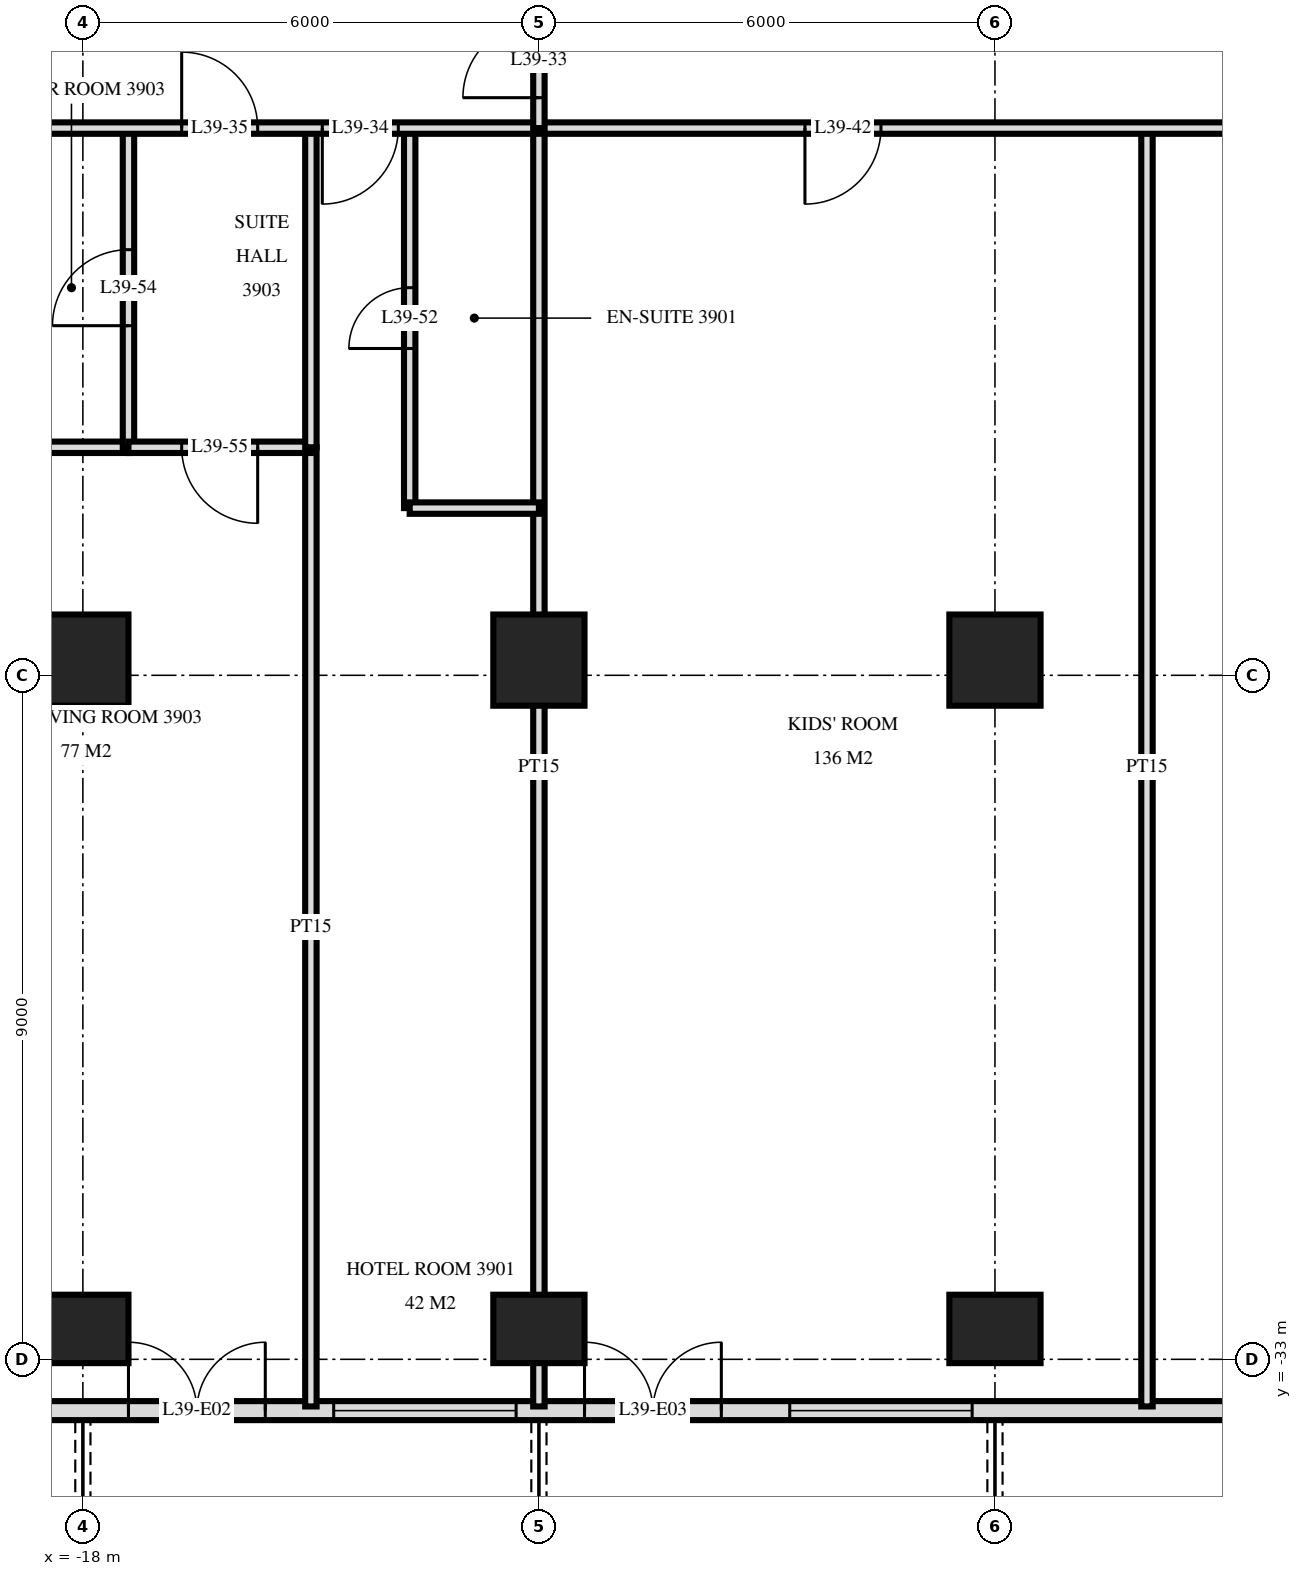
"""IFC4 building model, lengths in metres.
Left out: names, types, materials, properties, quantities, classifications, styles, units other than length and angle.
Written with IfcOpenShell. Run it as: python <this file> out.ifc"""

import sys

from ifc_helpers import new_model, si_unit, direction, frame, frame_2d, origin, origin_2d, place, context, subcontext, project, spatial, rectangle, extrude, element, fill, save


model = new_model("IFC4")
c1 = context("Model", 3, precision=1e-05, world=origin(), true_north=direction((0.0, 1.0)))
c2 = subcontext(c1, "Body", "Model", "MODEL_VIEW")
j1 = project(units=[si_unit("LENGTHUNIT", "METRE"), si_unit("PLANEANGLEUNIT", "RADIAN")], contexts=[c1])
p1 = place(None, origin())
s1 = spatial("IfcSite", under=j1, at=p1, CompositionType="ELEMENT")
p2 = place(p1, origin())
s2 = spatial("IfcBuilding", under=s1, at=p2, CompositionType="ELEMENT")
p3 = place(p2, frame((0.0, 0.0, 152.4)))
s3 = spatial("IfcBuildingStorey", under=s2, at=p3, CompositionType="ELEMENT", Elevation=152.4)
p4 = place(p3, frame((-18.0, -32.6, 0.0), z_axis=(0.0, 0.0, 1.0), x_axis=(1.0, 0.0, 0.0)))
e1 = element("IfcColumn", 1, at=p4, inside=s3, PredefinedType="COLUMN", context=c2, shape_type="SweptSolid", body=[
    extrude(rectangle(XDim=1.2, YDim=0.9, at=origin_2d()), origin(), (0.0, 0.0, 1.0), 3.6),
])
p5 = place(p3, frame((-18.0, -23.8, 0.0), z_axis=(0.0, 0.0, 1.0), x_axis=(1.0, 0.0, 0.0)))
e2 = element("IfcColumn", 2, at=p5, inside=s3, PredefinedType="COLUMN", context=c2, shape_type="SweptSolid", body=[
    extrude(rectangle(XDim=1.2, YDim=1.2, at=origin_2d()), origin(), (0.0, 0.0, 1.0), 3.6),
])
p6 = place(p3, frame((-12.0, -32.6, 0.0), z_axis=(0.0, 0.0, 1.0), x_axis=(1.0, 0.0, 0.0)))
e3 = element("IfcColumn", 3, at=p6, inside=s3, PredefinedType="COLUMN", context=c2, shape_type="SweptSolid", body=[
    extrude(rectangle(XDim=1.2, YDim=0.9, at=origin_2d()), origin(), (0.0, 0.0, 1.0), 3.6),
])
p7 = place(p3, frame((-12.0, -23.8, 0.0), z_axis=(0.0, 0.0, 1.0), x_axis=(1.0, 0.0, 0.0)))
e4 = element("IfcColumn", 4, at=p7, inside=s3, PredefinedType="COLUMN", context=c2, shape_type="SweptSolid", body=[
    extrude(rectangle(XDim=1.2, YDim=1.2, at=origin_2d()), origin(), (0.0, 0.0, 1.0), 3.6),
])
p8 = place(p3, frame((-6.0, -32.6, 0.0), z_axis=(0.0, 0.0, 1.0), x_axis=(1.0, 0.0, 0.0)))
e5 = element("IfcColumn", 5, at=p8, inside=s3, PredefinedType="COLUMN", context=c2, shape_type="SweptSolid", body=[
    extrude(rectangle(XDim=1.2, YDim=0.9, at=origin_2d()), origin(), (0.0, 0.0, 1.0), 3.6),
])
p9 = place(p3, frame((-6.0, -23.8, 0.0), z_axis=(0.0, 0.0, 1.0), x_axis=(1.0, 0.0, 0.0)))
e6 = element("IfcColumn", 6, at=p9, inside=s3, PredefinedType="COLUMN", context=c2, shape_type="SweptSolid", body=[
    extrude(rectangle(XDim=1.2, YDim=1.2, at=origin_2d()), origin(), (0.0, 0.0, 1.0), 3.6),
])
p10 = place(p3, frame((-23.675, -33.675, 0.0), z_axis=(0.0, 0.0, 1.0), x_axis=(1.0, 0.0, 0.0)))
e7 = element("IfcWall", 7, at=p10, inside=s3, PredefinedType="SOLIDWALL", context=c2, shape_type="SweptSolid", body=[
    extrude(rectangle(XDim=47.351, YDim=0.25, at=frame_2d((23.675, 0.0))), origin(), (0.0, 0.0, 1.0), 3.32),
])
p11 = place(p10, frame((3.425, 0.0, 0.0)))
e8 = element("IfcOpeningElement", 8, at=p11, cuts=e7, PredefinedType="OPENING", context=c2, shape_type="SweptSolid", body=[
    extrude(rectangle(XDim=1.8, YDim=2.4, at=frame_2d((0.9, 1.2))), frame((0.0, 0.135, 0.0), z_axis=(0.0, -1.0, 0.0), x_axis=(1.0, 0.0, 0.0)), (0.0, 0.0, 1.0), 0.27),
])
p12 = place(p10, frame((6.275, 0.0, 0.0)))
e9 = element("IfcOpeningElement", 9, at=p12, cuts=e7, PredefinedType="OPENING", context=c2, shape_type="SweptSolid", body=[
    extrude(rectangle(XDim=1.8, YDim=2.4, at=frame_2d((0.9, 1.2))), frame((0.0, 0.135, 0.0), z_axis=(0.0, -1.0, 0.0), x_axis=(1.0, 0.0, 0.0)), (0.0, 0.0, 1.0), 0.27),
])
p13 = place(p10, frame((8.975, 0.0, 0.3)))
e10 = element("IfcOpeningElement", 10, at=p13, cuts=e7, PredefinedType="OPENING", context=c2, shape_type="SweptSolid", body=[
    extrude(rectangle(XDim=2.4, YDim=2.1, at=frame_2d((1.2, 1.05))), frame((0.0, 0.135, 0.0), z_axis=(0.0, -1.0, 0.0), x_axis=(1.0, 0.0, 0.0)), (0.0, 0.0, 1.0), 0.27),
])
p14 = place(p10, frame((12.275, 0.0, 0.0)))
e11 = element("IfcOpeningElement", 11, at=p14, cuts=e7, PredefinedType="OPENING", context=c2, shape_type="SweptSolid", body=[
    extrude(rectangle(XDim=1.8, YDim=2.4, at=frame_2d((0.9, 1.2))), frame((0.0, 0.135, 0.0), z_axis=(0.0, -1.0, 0.0), x_axis=(1.0, 0.0, 0.0)), (0.0, 0.0, 1.0), 0.27),
])
p15 = place(p10, frame((14.975, 0.0, 0.3)))
e12 = element("IfcOpeningElement", 12, at=p15, cuts=e7, PredefinedType="OPENING", context=c2, shape_type="SweptSolid", body=[
    extrude(rectangle(XDim=2.4, YDim=2.1, at=frame_2d((1.2, 1.05))), frame((0.0, 0.135, 0.0), z_axis=(0.0, -1.0, 0.0), x_axis=(1.0, 0.0, 0.0)), (0.0, 0.0, 1.0), 0.27),
])
p16 = place(p10, frame((21.275, 0.0, 0.0)))
e13 = element("IfcOpeningElement", 13, at=p16, cuts=e7, PredefinedType="OPENING", context=c2, shape_type="SweptSolid", body=[
    extrude(rectangle(XDim=1.8, YDim=2.4, at=frame_2d((0.9, 1.2))), frame((0.0, 0.135, 0.0), z_axis=(0.0, -1.0, 0.0), x_axis=(1.0, 0.0, 0.0)), (0.0, 0.0, 1.0), 0.27),
])
p17 = place(p10, frame((24.275, 0.0, 0.0)))
e14 = element("IfcOpeningElement", 14, at=p17, cuts=e7, PredefinedType="OPENING", context=c2, shape_type="SweptSolid", body=[
    extrude(rectangle(XDim=1.8, YDim=2.4, at=frame_2d((0.9, 1.2))), frame((0.0, 0.135, 0.0), z_axis=(0.0, -1.0, 0.0), x_axis=(1.0, 0.0, 0.0)), (0.0, 0.0, 1.0), 0.27),
])
p18 = place(p10, frame((30.275, 0.0, 0.0)))
e15 = element("IfcOpeningElement", 15, at=p18, cuts=e7, PredefinedType="OPENING", context=c2, shape_type="SweptSolid", body=[
    extrude(rectangle(XDim=1.8, YDim=2.4, at=frame_2d((0.9, 1.2))), frame((0.0, 0.135, 0.0), z_axis=(0.0, -1.0, 0.0), x_axis=(1.0, 0.0, 0.0)), (0.0, 0.0, 1.0), 0.27),
])
p19 = place(p10, frame((32.975, 0.0, 0.3)))
e16 = element("IfcOpeningElement", 16, at=p19, cuts=e7, PredefinedType="OPENING", context=c2, shape_type="SweptSolid", body=[
    extrude(rectangle(XDim=2.4, YDim=2.1, at=frame_2d((1.2, 1.05))), frame((0.0, 0.135, 0.0), z_axis=(0.0, -1.0, 0.0), x_axis=(1.0, 0.0, 0.0)), (0.0, 0.0, 1.0), 0.27),
])
p20 = place(p10, frame((36.275, 0.0, 0.0)))
e17 = element("IfcOpeningElement", 17, at=p20, cuts=e7, PredefinedType="OPENING", context=c2, shape_type="SweptSolid", body=[
    extrude(rectangle(XDim=1.8, YDim=2.4, at=frame_2d((0.9, 1.2))), frame((0.0, 0.135, 0.0), z_axis=(0.0, -1.0, 0.0), x_axis=(1.0, 0.0, 0.0)), (0.0, 0.0, 1.0), 0.27),
])
p21 = place(p10, frame((38.975, 0.0, 0.3)))
e18 = element("IfcOpeningElement", 18, at=p21, cuts=e7, PredefinedType="OPENING", context=c2, shape_type="SweptSolid", body=[
    extrude(rectangle(XDim=2.4, YDim=2.1, at=frame_2d((1.2, 1.05))), frame((0.0, 0.135, 0.0), z_axis=(0.0, -1.0, 0.0), x_axis=(1.0, 0.0, 0.0)), (0.0, 0.0, 1.0), 0.27),
])
p22 = place(p10, frame((42.275, 0.0, 0.0)))
e19 = element("IfcOpeningElement", 19, at=p22, cuts=e7, PredefinedType="OPENING", context=c2, shape_type="SweptSolid", body=[
    extrude(rectangle(XDim=1.8, YDim=2.4, at=frame_2d((0.9, 1.2))), frame((0.0, 0.135, 0.0), z_axis=(0.0, -1.0, 0.0), x_axis=(1.0, 0.0, 0.0)), (0.0, 0.0, 1.0), 0.27),
])
p23 = place(p10, frame((45.125, 0.0, 0.3)))
e20 = element("IfcOpeningElement", 20, at=p23, cuts=e7, PredefinedType="OPENING", context=c2, shape_type="SweptSolid", body=[
    extrude(rectangle(XDim=1.8, YDim=2.1, at=frame_2d((0.9, 1.05))), frame((0.0, 0.135, 0.0), z_axis=(0.0, -1.0, 0.0), x_axis=(1.0, 0.0, 0.0)), (0.0, 0.0, 1.0), 0.27),
])
p24 = place(p3, frame((-4.0, -33.62, 0.0), z_axis=(0.0, 0.0, 1.0), x_axis=(0.0, 1.0, 0.0)))
e21 = element("IfcWall", 21, at=p24, inside=s3, PredefinedType="PARTITIONING", context=c2, shape_type="SweptSolid", body=[
    extrude(rectangle(XDim=16.82, YDim=0.15, at=frame_2d((8.41, 0.0))), origin(), (0.0, 0.0, 1.0), 3.32),
])
p25 = place(p3, frame((-12.0, -16.8, 0.0), z_axis=(0.0, 0.0, 1.0), x_axis=(0.0, 1.0, 0.0)))
e22 = element("IfcWall", 22, at=p25, inside=s3, PredefinedType="PARTITIONING", context=c2, shape_type="SweptSolid", body=[
    extrude(rectangle(XDim=1.75, YDim=0.15, at=frame_2d((0.875, 0.0))), origin(), (0.0, 0.0, 1.0), 3.32),
])
p26 = place(p25, frame((0.4, 0.0, 0.0)))
e23 = element("IfcOpeningElement", 23, at=p26, cuts=e22, PredefinedType="OPENING", context=c2, shape_type="SweptSolid", body=[
    extrude(rectangle(XDim=1.0, YDim=2.1, at=frame_2d((0.5, 1.05))), frame((0.0, 0.085, 0.0), z_axis=(0.0, -1.0, 0.0), x_axis=(1.0, 0.0, 0.0)), (0.0, 0.0, 1.0), 0.17),
])
p27 = place(p3, frame((-12.0, -33.62, 0.0), z_axis=(0.0, 0.0, 1.0), x_axis=(0.0, 1.0, 0.0)))
e24 = element("IfcWall", 24, at=p27, inside=s3, PredefinedType="PARTITIONING", context=c2, shape_type="SweptSolid", body=[
    extrude(rectangle(XDim=16.82, YDim=0.15, at=frame_2d((8.41, 0.0))), origin(), (0.0, 0.0, 1.0), 3.32),
])
p28 = place(p3, frame((-13.7, -21.8, 0.0), z_axis=(0.0, 0.0, 1.0), x_axis=(0.0, 1.0, 0.0)))
e25 = element("IfcWall", 25, at=p28, inside=s3, PredefinedType="PARTITIONING", context=c2, shape_type="SweptSolid", body=[
    extrude(rectangle(XDim=5.0, YDim=0.15, at=frame_2d((2.5, 0.0))), origin(), (0.0, 0.0, 1.0), 3.32),
])
p29 = place(p28, frame((2.1, 0.0, 0.0)))
e26 = element("IfcOpeningElement", 26, at=p29, cuts=e25, PredefinedType="OPENING", context=c2, shape_type="SweptSolid", body=[
    extrude(rectangle(XDim=0.8, YDim=2.1, at=frame_2d((0.4, 1.05))), frame((0.0, 0.085, 0.0), z_axis=(0.0, -1.0, 0.0), x_axis=(1.0, 0.0, 0.0)), (0.0, 0.0, 1.0), 0.17),
])
p30 = place(p3, frame((-15.0, -21.0, 0.0), z_axis=(0.0, 0.0, 1.0), x_axis=(0.0, 1.0, 0.0)))
e27 = element("IfcWall", 27, at=p30, inside=s3, PredefinedType="PARTITIONING", context=c2, shape_type="SweptSolid", body=[
    extrude(rectangle(XDim=4.2, YDim=0.15, at=frame_2d((2.1, 0.0))), origin(), (0.0, 0.0, 1.0), 3.32),
])
p31 = place(p3, frame((-15.0, -33.62, 0.0), z_axis=(0.0, 0.0, 1.0), x_axis=(0.0, 1.0, 0.0)))
e28 = element("IfcWall", 28, at=p31, inside=s3, PredefinedType="PARTITIONING", context=c2, shape_type="SweptSolid", body=[
    extrude(rectangle(XDim=12.62, YDim=0.15, at=frame_2d((6.31, 0.0))), origin(), (0.0, 0.0, 1.0), 3.32),
])
p32 = place(p3, frame((-17.4, -21.0, 0.0), z_axis=(0.0, 0.0, 1.0), x_axis=(0.0, 1.0, 0.0)))
e29 = element("IfcWall", 29, at=p32, inside=s3, PredefinedType="PARTITIONING", context=c2, shape_type="SweptSolid", body=[
    extrude(rectangle(XDim=4.2, YDim=0.15, at=frame_2d((2.1, 0.0))), origin(), (0.0, 0.0, 1.0), 3.32),
])
p33 = place(p32, frame((1.6, 0.0, 0.0)))
e30 = element("IfcOpeningElement", 30, at=p33, cuts=e29, PredefinedType="OPENING", context=c2, shape_type="SweptSolid", body=[
    extrude(rectangle(XDim=1.0, YDim=2.1, at=frame_2d((0.5, 1.05))), frame((0.0, 0.085, 0.0), z_axis=(0.0, -1.0, 0.0), x_axis=(1.0, 0.0, 0.0)), (0.0, 0.0, 1.0), 0.17),
])
p34 = place(p3, frame((-13.7, -21.8, 0.0), z_axis=(0.0, 0.0, 1.0), x_axis=(1.0, 0.0, 0.0)))
e31 = element("IfcWall", 31, at=p34, inside=s3, PredefinedType="PARTITIONING", context=c2, shape_type="SweptSolid", body=[
    extrude(rectangle(XDim=1.7, YDim=0.15, at=frame_2d((0.85, 0.0))), origin(), (0.0, 0.0, 1.0), 3.32),
])
p35 = place(p3, frame((-17.4, -21.0, 0.0), z_axis=(0.0, 0.0, 1.0), x_axis=(1.0, 0.0, 0.0)))
e32 = element("IfcWall", 32, at=p35, inside=s3, PredefinedType="PARTITIONING", context=c2, shape_type="SweptSolid", body=[
    extrude(rectangle(XDim=2.4, YDim=0.15, at=frame_2d((1.2, 0.0))), origin(), (0.0, 0.0, 1.0), 3.32),
])
p36 = place(p35, frame((0.7, 0.0, 0.0)))
e33 = element("IfcOpeningElement", 33, at=p36, cuts=e32, PredefinedType="OPENING", context=c2, shape_type="SweptSolid", body=[
    extrude(rectangle(XDim=1.0, YDim=2.1, at=frame_2d((0.5, 1.05))), frame((0.0, 0.085, 0.0), z_axis=(0.0, -1.0, 0.0), x_axis=(1.0, 0.0, 0.0)), (0.0, 0.0, 1.0), 0.17),
])
p37 = place(p3, frame((-18.9, -21.0, 0.0), z_axis=(0.0, 0.0, 1.0), x_axis=(1.0, 0.0, 0.0)))
e34 = element("IfcWall", 34, at=p37, inside=s3, PredefinedType="PLUMBINGWALL", context=c2, shape_type="SweptSolid", body=[
    extrude(rectangle(XDim=1.5, YDim=0.15, at=frame_2d((0.75, 0.0))), origin(), (0.0, 0.0, 1.0), 3.32),
])
p38 = place(p3, frame((-28.02, -16.8, 0.0), z_axis=(0.0, 0.0, 1.0), x_axis=(1.0, 0.0, 0.0)))
e35 = element("IfcWall", 35, at=p38, inside=s3, PredefinedType="PARTITIONING", context=c2, shape_type="SweptSolid", body=[
    extrude(rectangle(XDim=56.04, YDim=0.15, at=frame_2d((28.02, 0.0))), origin(), (0.0, 0.0, 1.0), 3.32),
])
p39 = place(p38, frame((13.17, 0.0, 0.0)))
e36 = element("IfcOpeningElement", 36, at=p39, cuts=e35, PredefinedType="OPENING", context=c2, shape_type="SweptSolid", body=[
    extrude(rectangle(XDim=1.0, YDim=2.1, at=frame_2d((0.5, 1.05))), frame((0.0, 0.085, 0.0), z_axis=(0.0, -1.0, 0.0), x_axis=(1.0, 0.0, 0.0)), (0.0, 0.0, 1.0), 0.17),
])
p40 = place(p38, frame((11.32, 0.0, 0.0)))
e37 = element("IfcOpeningElement", 37, at=p40, cuts=e35, PredefinedType="OPENING", context=c2, shape_type="SweptSolid", body=[
    extrude(rectangle(XDim=1.0, YDim=2.1, at=frame_2d((0.5, 1.05))), frame((0.0, 0.085, 0.0), z_axis=(0.0, -1.0, 0.0), x_axis=(1.0, 0.0, 0.0)), (0.0, 0.0, 1.0), 0.17),
])
p41 = place(p38, frame((41.87, 0.0, 0.0)))
e38 = element("IfcOpeningElement", 38, at=p41, cuts=e35, PredefinedType="OPENING", context=c2, shape_type="SweptSolid", body=[
    extrude(rectangle(XDim=1.0, YDim=2.1, at=frame_2d((0.5, 1.05))), frame((0.0, 0.085, 0.0), z_axis=(0.0, -1.0, 0.0), x_axis=(1.0, 0.0, 0.0)), (0.0, 0.0, 1.0), 0.17),
])
p42 = place(p38, frame((43.72, 0.0, 0.0)))
e39 = element("IfcOpeningElement", 39, at=p42, cuts=e35, PredefinedType="OPENING", context=c2, shape_type="SweptSolid", body=[
    extrude(rectangle(XDim=1.0, YDim=2.1, at=frame_2d((0.5, 1.05))), frame((0.0, 0.085, 0.0), z_axis=(0.0, -1.0, 0.0), x_axis=(1.0, 0.0, 0.0)), (0.0, 0.0, 1.0), 0.17),
])
p43 = place(p38, frame((19.52, 0.0, 0.0)))
e40 = element("IfcOpeningElement", 40, at=p43, cuts=e35, PredefinedType="OPENING", context=c2, shape_type="SweptSolid", body=[
    extrude(rectangle(XDim=1.0, YDim=2.1, at=frame_2d((0.5, 1.05))), frame((0.0, 0.085, 0.0), z_axis=(0.0, -1.0, 0.0), x_axis=(1.0, 0.0, 0.0)), (0.0, 0.0, 1.0), 0.17),
])
p44 = place(p38, frame((27.52, 0.0, 0.0)))
e41 = element("IfcOpeningElement", 41, at=p44, cuts=e35, PredefinedType="OPENING", context=c2, shape_type="SweptSolid", body=[
    extrude(rectangle(XDim=1.0, YDim=2.1, at=frame_2d((0.5, 1.05))), frame((0.0, 0.085, 0.0), z_axis=(0.0, -1.0, 0.0), x_axis=(1.0, 0.0, 0.0)), (0.0, 0.0, 1.0), 0.17),
])
p45 = place(p38, frame((35.52, 0.0, 0.0)))
e42 = element("IfcOpeningElement", 42, at=p45, cuts=e35, PredefinedType="OPENING", context=c2, shape_type="SweptSolid", body=[
    extrude(rectangle(XDim=1.0, YDim=2.1, at=frame_2d((0.5, 1.05))), frame((0.0, 0.085, 0.0), z_axis=(0.0, -1.0, 0.0), x_axis=(1.0, 0.0, 0.0)), (0.0, 0.0, 1.0), 0.17),
])
p46 = place(p12, origin())
e43 = element("IfcDoor", 43, at=p46, inside=s3, OperationType="DOUBLE_DOOR_SINGLE_SWING", PredefinedType="DOOR", context=c2, shape_type="SweptSolid", body=[
    extrude(rectangle(XDim=1.8, YDim=2.4, at=frame_2d((0.9, 1.2))), frame((0.0, 0.025, 0.0), z_axis=(0.0, -1.0, 0.0), x_axis=(1.0, 0.0, 0.0)), (0.0, 0.0, 1.0), 0.05),
])
fill(e9, e43)
p47 = place(p13, origin())
e44 = element("IfcWindow", 44, at=p47, inside=s3, PartitioningType="SINGLE_PANEL", PredefinedType="WINDOW", context=c2, shape_type="SweptSolid", body=[
    extrude(rectangle(XDim=2.4, YDim=2.1, at=frame_2d((1.2, 1.05))), frame((0.0, 0.03, 0.0), z_axis=(0.0, -1.0, 0.0), x_axis=(1.0, 0.0, 0.0)), (0.0, 0.0, 1.0), 0.06),
])
fill(e10, e44)
p48 = place(p14, origin())
e45 = element("IfcDoor", 45, at=p48, inside=s3, OperationType="DOUBLE_DOOR_SINGLE_SWING", PredefinedType="DOOR", context=c2, shape_type="SweptSolid", body=[
    extrude(rectangle(XDim=1.8, YDim=2.4, at=frame_2d((0.9, 1.2))), frame((0.0, 0.025, 0.0), z_axis=(0.0, -1.0, 0.0), x_axis=(1.0, 0.0, 0.0)), (0.0, 0.0, 1.0), 0.05),
])
fill(e11, e45)
p49 = place(p15, origin())
e46 = element("IfcWindow", 46, at=p49, inside=s3, PartitioningType="SINGLE_PANEL", PredefinedType="WINDOW", context=c2, shape_type="SweptSolid", body=[
    extrude(rectangle(XDim=2.4, YDim=2.1, at=frame_2d((1.2, 1.05))), frame((0.0, 0.03, 0.0), z_axis=(0.0, -1.0, 0.0), x_axis=(1.0, 0.0, 0.0)), (0.0, 0.0, 1.0), 0.06),
])
fill(e12, e46)
p50 = place(p26, origin())
e47 = element("IfcDoor", 47, at=p50, inside=s3, OperationType="SINGLE_SWING_RIGHT", PredefinedType="DOOR", context=c2, shape_type="SweptSolid", body=[
    extrude(rectangle(XDim=1.0, YDim=2.1, at=frame_2d((0.5, 1.05))), frame((0.0, 0.025, 0.0), z_axis=(0.0, -1.0, 0.0), x_axis=(1.0, 0.0, 0.0)), (0.0, 0.0, 1.0), 0.05),
])
fill(e23, e47)
p51 = place(p39, frame((0.5, 0.0, 0.0), z_axis=(0.0, 0.0, 1.0), x_axis=(-1.0, 0.0, 0.0)))
e48 = element("IfcDoor", 48, at=p51, inside=s3, OperationType="SINGLE_SWING_LEFT", PredefinedType="DOOR", context=c2, shape_type="SweptSolid", body=[
    extrude(rectangle(XDim=1.0, YDim=2.1, at=frame_2d((0.0, 1.05))), frame((0.0, -0.025, 0.0), z_axis=(0.0, 1.0, 0.0), x_axis=(-1.0, 0.0, 0.0)), (0.0, 0.0, 1.0), 0.05),
])
fill(e36, e48)
p52 = place(p40, origin())
e49 = element("IfcDoor", 49, at=p52, inside=s3, OperationType="SINGLE_SWING_RIGHT", PredefinedType="DOOR", context=c2, shape_type="SweptSolid", body=[
    extrude(rectangle(XDim=1.0, YDim=2.1, at=frame_2d((0.5, 1.05))), frame((0.0, 0.025, 0.0), z_axis=(0.0, -1.0, 0.0), x_axis=(1.0, 0.0, 0.0)), (0.0, 0.0, 1.0), 0.05),
])
fill(e37, e49)
p53 = place(p43, frame((0.5, 0.0, 0.0), z_axis=(0.0, 0.0, 1.0), x_axis=(-1.0, 0.0, 0.0)))
e50 = element("IfcDoor", 50, at=p53, inside=s3, OperationType="SINGLE_SWING_LEFT", PredefinedType="DOOR", context=c2, shape_type="SweptSolid", body=[
    extrude(rectangle(XDim=1.0, YDim=2.1, at=frame_2d((0.0, 1.05))), frame((0.0, -0.025, 0.0), z_axis=(0.0, 1.0, 0.0), x_axis=(-1.0, 0.0, 0.0)), (0.0, 0.0, 1.0), 0.05),
])
fill(e40, e50)
p54 = place(p29, origin())
e51 = element("IfcDoor", 51, at=p54, inside=s3, OperationType="SINGLE_SWING_RIGHT", PredefinedType="DOOR", context=c2, shape_type="SweptSolid", body=[
    extrude(rectangle(XDim=0.8, YDim=2.1, at=frame_2d((0.4, 1.05))), frame((0.0, 0.025, 0.0), z_axis=(0.0, -1.0, 0.0), x_axis=(1.0, 0.0, 0.0)), (0.0, 0.0, 1.0), 0.05),
])
fill(e26, e51)
p55 = place(p33, origin())
e52 = element("IfcDoor", 52, at=p55, inside=s3, OperationType="SINGLE_SWING_RIGHT", PredefinedType="DOOR", context=c2, shape_type="SweptSolid", body=[
    extrude(rectangle(XDim=1.0, YDim=2.1, at=frame_2d((0.5, 1.05))), frame((0.0, 0.025, 0.0), z_axis=(0.0, -1.0, 0.0), x_axis=(1.0, 0.0, 0.0)), (0.0, 0.0, 1.0), 0.05),
])
fill(e30, e52)
p56 = place(p36, frame((0.5, 0.0, 0.0), z_axis=(0.0, 0.0, 1.0), x_axis=(-1.0, 0.0, 0.0)))
e53 = element("IfcDoor", 53, at=p56, inside=s3, OperationType="SINGLE_SWING_RIGHT", PredefinedType="DOOR", context=c2, shape_type="SweptSolid", body=[
    extrude(rectangle(XDim=1.0, YDim=2.1, at=frame_2d((0.0, 1.05))), frame((0.0, -0.025, 0.0), z_axis=(0.0, 1.0, 0.0), x_axis=(-1.0, 0.0, 0.0)), (0.0, 0.0, 1.0), 0.05),
])
fill(e33, e53)
save(model, sys.argv[1])
